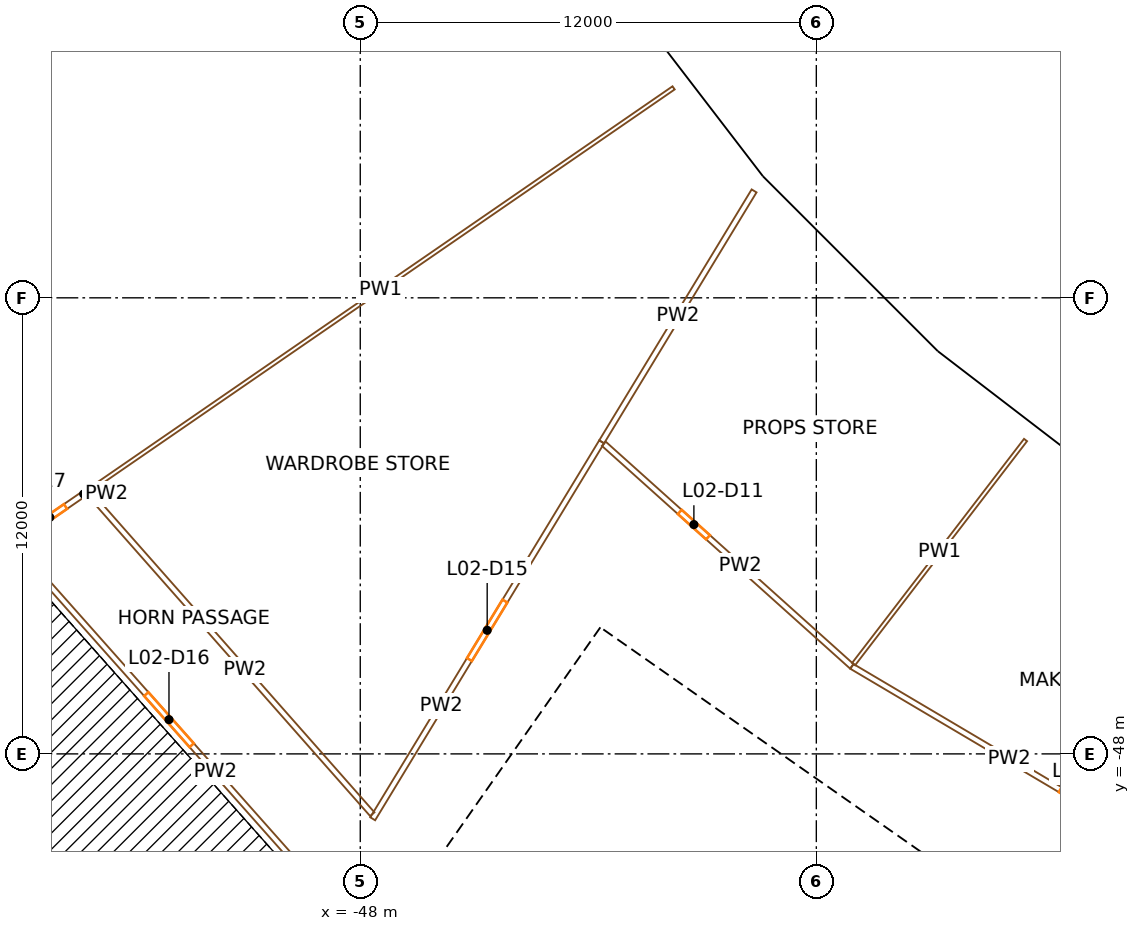
"""IFC4 building model, lengths in metres.
Left out: names, types, materials, properties, quantities, classifications, styles, units other than length and angle.
Written with IfcOpenShell. Run it as: python <this file> out.ifc"""

import sys

from ifc_helpers import new_model, si_unit, direction, frame, frame_2d, origin, origin_2d, place, context, subcontext, project, spatial, rectangle, extrude, element, fill, save


model = new_model("IFC4")
c1 = context("Model", 3, precision=1e-05, world=origin(), true_north=direction((0.0, 1.0)))
c2 = subcontext(c1, "Body", "Model", "MODEL_VIEW")
j1 = project(units=[si_unit("LENGTHUNIT", "METRE"), si_unit("PLANEANGLEUNIT", "RADIAN")], contexts=[c1])
p1 = place(None, origin())
s1 = spatial("IfcSite", under=j1, at=p1, CompositionType="ELEMENT")
p2 = place(p1, origin())
s2 = spatial("IfcBuilding", under=s1, at=p2, CompositionType="ELEMENT")
p3 = place(p2, frame((0.0, 0.0, 18.0)))
s3 = spatial("IfcBuildingStorey", under=s2, at=p3, CompositionType="ELEMENT", Elevation=18.0)
p4 = place(p3, frame((-48.433, -32.362, 0.0), z_axis=(0.0, 0.0, 1.0), x_axis=(0.55557023302, -0.831469612303, 0.0)))
e1 = element("IfcColumn", 1, at=p4, inside=s3, PredefinedType="COLUMN", context=c2, shape_type="SweptSolid", body=[
    extrude(rectangle(XDim=1.4, YDim=1.8, at=origin_2d()), origin(), (0.0, 0.0, 1.0), 9.0),
])
p5 = place(p3, frame((-38.156, -33.462, 0.0), z_axis=(0.0, 0.0, 1.0), x_axis=(0.6593458151, -0.751839807479, 0.0)))
e2 = element("IfcColumn", 2, at=p5, inside=s3, PredefinedType="COLUMN", context=c2, shape_type="SweptSolid", body=[
    extrude(rectangle(XDim=1.1, YDim=1.3, at=origin_2d()), origin(), (0.0, 0.0, 1.0), 9.0),
])
p6 = place(p3, frame((-43.795, -38.407, 0.0), z_axis=(0.0, 0.0, 1.0), x_axis=(0.6593458151, -0.751839807479, 0.0)))
e3 = element("IfcColumn", 3, at=p6, inside=s3, PredefinedType="COLUMN", context=c2, shape_type="SweptSolid", body=[
    extrude(rectangle(XDim=1.4, YDim=1.8, at=origin_2d()), origin(), (0.0, 0.0, 1.0), 9.0),
])
p7 = place(p3, frame((-33.462, -38.156, 0.0), z_axis=(0.0, 0.0, 1.0), x_axis=(0.751839807479, -0.6593458151, 0.0)))
e4 = element("IfcColumn", 4, at=p7, inside=s3, PredefinedType="COLUMN", context=c2, shape_type="SweptSolid", body=[
    extrude(rectangle(XDim=1.1, YDim=1.3, at=origin_2d()), origin(), (0.0, 0.0, 1.0), 9.0),
])
for number, where, z_axis, x_axis in (
    (5, (-38.407, -43.795, 0.0), (0.0, 0.0, 1.0), (0.752, -0.659, 0.0)),
    (6, (-32.362, -48.433, 0.0), (0.0, 0.0, 1.0), (0.831, -0.556, 0.0)),
):
    element("IfcColumn", number, at=place(p3, frame(where, z_axis=z_axis, x_axis=x_axis)), inside=s3, PredefinedType="COLUMN", context=c2, shape_type="SweptSolid", body=[
        extrude(rectangle(XDim=1.4, YDim=1.8, at=origin_2d()), origin(), (0.0, 0.0, 1.0), 9.0),
    ])
p8 = place(p3, frame((-49.779, -57.191, 0.0), z_axis=(0.0, 0.0, 1.0), x_axis=(0.573577477574, 0.819151315216, 0.0)))
e7 = element("IfcWall", 7, at=p8, inside=s3, PredefinedType="SHEAR", context=c2, shape_type="SweptSolid", body=[
    extrude(rectangle(XDim=14.8, YDim=0.9, at=frame_2d((7.4, 0.0))), origin(), (0.0, 0.0, 1.0), 8.6),
])
p9 = place(p8, frame((6.7, 0.0, 0.0)))
e8 = element("IfcOpeningElement", 8, at=p9, cuts=e7, PredefinedType="OPENING", context=c2, shape_type="SweptSolid", body=[
    extrude(rectangle(XDim=1.4, YDim=2.1, at=frame_2d((0.7, 1.05))), frame((0.0, 0.46, 0.0), z_axis=(0.0, -1.0, 0.0), x_axis=(1.0, 0.0, 0.0)), (0.0, 0.0, 1.0), 0.92),
])
p10 = place(p3, frame((-28.854, -54.324, 0.0), z_axis=(0.0, 0.0, 1.0), x_axis=(-0.819145767589, 0.573585400304, 0.0)))
e9 = element("IfcWall", 9, at=p10, inside=s3, PredefinedType="SHEAR", context=c2, shape_type="SweptSolid", body=[
    extrude(rectangle(XDim=15.045, YDim=0.9, at=frame_2d((7.523, 0.0))), origin(), (0.0, 0.0, 1.0), 8.6),
])
p11 = place(p10, frame((0.6, 0.0, 0.0)))
e10 = element("IfcOpeningElement", 10, at=p11, cuts=e9, PredefinedType="OPENING", context=c2, shape_type="SweptSolid", body=[
    extrude(rectangle(XDim=1.0, YDim=2.1, at=frame_2d((0.5, 1.05))), frame((0.0, 0.46, 0.0), z_axis=(0.0, -1.0, 0.0), x_axis=(1.0, 0.0, 0.0)), (0.0, 0.0, 1.0), 0.92),
])
p12 = place(p10, frame((3.275, 0.0, 0.0)))
e11 = element("IfcOpeningElement", 11, at=p12, cuts=e9, PredefinedType="OPENING", context=c2, shape_type="SweptSolid", body=[
    extrude(rectangle(XDim=1.0, YDim=2.1, at=frame_2d((0.5, 1.05))), frame((0.0, 0.46, 0.0), z_axis=(0.0, -1.0, 0.0), x_axis=(1.0, 0.0, 0.0)), (0.0, 0.0, 1.0), 0.92),
])
p13 = place(p10, frame((6.225, 0.0, 0.0)))
e12 = element("IfcOpeningElement", 12, at=p13, cuts=e9, PredefinedType="OPENING", context=c2, shape_type="SweptSolid", body=[
    extrude(rectangle(XDim=0.9, YDim=2.1, at=frame_2d((0.45, 1.05))), frame((0.0, 0.46, 0.0), z_axis=(0.0, -1.0, 0.0), x_axis=(1.0, 0.0, 0.0)), (0.0, 0.0, 1.0), 0.92),
])
p14 = place(p10, frame((13.495, 0.0, 0.0)))
e13 = element("IfcOpeningElement", 13, at=p14, cuts=e9, PredefinedType="OPENING", context=c2, shape_type="SweptSolid", body=[
    extrude(rectangle(XDim=1.1, YDim=2.1, at=frame_2d((0.55, 1.05))), frame((0.0, 0.46, 0.0), z_axis=(0.0, -1.0, 0.0), x_axis=(1.0, 0.0, 0.0)), (0.0, 0.0, 1.0), 0.92),
])
p15 = place(p3, frame((-43.204, -60.696, 0.0), z_axis=(0.0, 0.0, 1.0), x_axis=(0.573571992966, 0.819155155563, 0.0)))
e14 = element("IfcWall", 14, at=p15, inside=s3, PredefinedType="SOLIDWALL", context=c2, shape_type="SweptSolid", body=[
    extrude(rectangle(XDim=13.0, YDim=0.3, at=frame_2d((6.5, 0.0))), origin(), (0.0, 0.0, 1.0), 8.6),
])
p16 = place(p3, frame((-37.936, -52.91, 0.0), z_axis=(0.0, 0.0, 1.0), x_axis=(-0.819147518138, 0.57358290031, 0.0)))
e15 = element("IfcWall", 15, at=p16, inside=s3, PredefinedType="SOLIDWALL", context=c2, shape_type="SweptSolid", body=[
    extrude(rectangle(XDim=6.795, YDim=0.3, at=frame_2d((3.398, 0.0))), origin(), (0.0, 0.0, 1.0), 8.6),
])
p17 = place(p16, frame((5.32, 0.0, 0.0)))
e16 = element("IfcOpeningElement", 16, at=p17, cuts=e15, PredefinedType="OPENING", context=c2, shape_type="SweptSolid", body=[
    extrude(rectangle(XDim=1.1, YDim=2.1, at=frame_2d((0.55, 1.05))), frame((0.0, 0.16, 0.0), z_axis=(0.0, -1.0, 0.0), x_axis=(1.0, 0.0, 0.0)), (0.0, 0.0, 1.0), 0.32),
])
p18 = place(p3, frame((-41.587, -48.369, 0.0), z_axis=(0.0, 0.0, 1.0), x_axis=(0.573495128918, 0.819208970354, 0.0)))
e17 = element("IfcWall", 17, at=p18, inside=s3, PredefinedType="SOLIDWALL", context=c2, shape_type="SweptSolid", body=[
    extrude(rectangle(XDim=0.5, YDim=0.3, at=frame_2d((0.25, 0.0))), origin(), (0.0, 0.0, 1.0), 4.3),
])
p19 = place(p3, frame((-37.555, -32.975, 0.0), z_axis=(0.0, 0.0, 1.0), x_axis=(-0.608780327927, 0.793338838284, 0.0)))
e18 = element("IfcWall", 18, at=p19, inside=s3, PredefinedType="SOLIDWALL", context=c2, shape_type="SweptSolid", body=[
    extrude(rectangle(XDim=6.597, YDim=0.45, at=frame_2d((3.298, 0.0))), origin(), (0.0, 0.0, 1.0), 7.7),
])
p20 = place(p3, frame((-32.993, -37.532, 0.0), z_axis=(0.0, 0.0, 1.0), x_axis=(-0.707106781187, 0.707106781187, 0.0)))
e19 = element("IfcWall", 19, at=p20, inside=s3, PredefinedType="SOLIDWALL", context=c2, shape_type="SweptSolid", body=[
    extrude(rectangle(XDim=6.419, YDim=0.45, at=frame_2d((3.209, 0.0))), origin(), (0.0, 0.0, 1.0), 7.7),
])
p21 = place(p3, frame((-27.741, -41.571, 0.0), z_axis=(0.0, 0.0, 1.0), x_axis=(-0.793338838284, 0.608780327927, 0.0)))
e20 = element("IfcWall", 20, at=p21, inside=s3, PredefinedType="SOLIDWALL", context=c2, shape_type="SweptSolid", body=[
    extrude(rectangle(XDim=6.597, YDim=0.45, at=frame_2d((3.298, 0.0))), origin(), (0.0, 0.0, 1.0), 7.7),
])
p22 = place(p3, frame((-57.157, -42.456, 0.0), z_axis=(0.0, 0.0, 1.0), x_axis=(0.823667994332, 0.567072336755, 0.0)))
e21 = element("IfcWall", 21, at=p22, inside=s3, PredefinedType="PARTITIONING", context=c2, shape_type="SweptSolid", body=[
    extrude(rectangle(XDim=2.401, YDim=0.15, at=frame_2d((1.201, 0.0))), origin(), (0.0, 0.0, 1.0), 7.6),
])
p23 = place(p22, frame((0.701, 0.0, 0.0)))
e22 = element("IfcOpeningElement", 22, at=p23, cuts=e21, PredefinedType="OPENING", context=c2, shape_type="SweptSolid", body=[
    extrude(rectangle(XDim=1.0, YDim=2.1, at=frame_2d((0.5, 1.05))), frame((0.0, 0.085, 0.0), z_axis=(0.0, -1.0, 0.0), x_axis=(1.0, 0.0, 0.0)), (0.0, 0.0, 1.0), 0.17),
])
p24 = place(p3, frame((-55.179, -41.094, 0.0), z_axis=(0.0, 0.0, 1.0), x_axis=(0.823687587854, 0.56704387627, 0.0)))
e23 = element("IfcWall", 23, at=p24, inside=s3, PredefinedType="PARTITIONING", context=c2, shape_type="SweptSolid", body=[
    extrude(rectangle(XDim=18.725, YDim=0.1, at=frame_2d((9.363, 0.0))), origin(), (0.0, 0.0, 1.0), 7.6),
])
p25 = place(p3, frame((-48.959, -51.687, 0.0), z_axis=(0.0, 0.0, 1.0), x_axis=(-0.664036516543, 0.747700143572, 0.0)))
e24 = element("IfcWall", 24, at=p25, inside=s3, PredefinedType="PARTITIONING", context=c2, shape_type="SweptSolid", body=[
    extrude(rectangle(XDim=12.271, YDim=0.15, at=frame_2d((6.135, 0.0))), origin(), (0.0, 0.0, 1.0), 7.6),
])
p26 = place(p25, frame((5.235, 0.0, 0.0)))
e25 = element("IfcOpeningElement", 25, at=p26, cuts=e24, PredefinedType="OPENING", context=c2, shape_type="SweptSolid", body=[
    extrude(rectangle(XDim=1.8, YDim=2.1, at=frame_2d((0.9, 1.05))), frame((0.0, 0.085, 0.0), z_axis=(0.0, -1.0, 0.0), x_axis=(1.0, 0.0, 0.0)), (0.0, 0.0, 1.0), 0.17),
])
p27 = place(p3, frame((-47.683, -49.587, 0.0), z_axis=(0.0, 0.0, 1.0), x_axis=(-0.661713482334, 0.749756805436, 0.0)))
e26 = element("IfcWall", 26, at=p27, inside=s3, PredefinedType="PARTITIONING", context=c2, shape_type="SweptSolid", body=[
    extrude(rectangle(XDim=11.253, YDim=0.15, at=frame_2d((5.626, 0.0))), origin(), (0.0, 0.0, 1.0), 7.6),
])
p28 = place(p3, frame((-47.673, -49.708, 0.0), z_axis=(0.0, 0.0, 1.0), x_axis=(0.519159839294, 0.854677167862, 0.0)))
e27 = element("IfcWall", 27, at=p28, inside=s3, PredefinedType="PARTITIONING", context=c2, shape_type="SweptSolid", body=[
    extrude(rectangle(XDim=11.605, YDim=0.15, at=frame_2d((5.802, 0.0))), origin(), (0.0, 0.0, 1.0), 7.6),
])
p29 = place(p28, frame((4.902, 0.0, 0.0)))
e28 = element("IfcOpeningElement", 28, at=p29, cuts=e27, PredefinedType="OPENING", context=c2, shape_type="SweptSolid", body=[
    extrude(rectangle(XDim=1.8, YDim=2.1, at=frame_2d((0.9, 1.05))), frame((0.0, 0.085, 0.0), z_axis=(0.0, -1.0, 0.0), x_axis=(1.0, 0.0, 0.0)), (0.0, 0.0, 1.0), 0.17),
])
p30 = place(p3, frame((-41.592, -39.839, 0.0), z_axis=(0.0, 0.0, 1.0), x_axis=(0.744252572607, -0.667898276812, 0.0)))
e29 = element("IfcWall", 29, at=p30, inside=s3, PredefinedType="PARTITIONING", context=c2, shape_type="SweptSolid", body=[
    extrude(rectangle(XDim=8.771, YDim=0.15, at=frame_2d((4.385, 0.0))), origin(), (0.0, 0.0, 1.0), 7.6),
])
p31 = place(p30, frame((2.685, 0.0, 0.0)))
e30 = element("IfcOpeningElement", 30, at=p31, cuts=e29, PredefinedType="OPENING", context=c2, shape_type="SweptSolid", body=[
    extrude(rectangle(XDim=1.0, YDim=2.1, at=frame_2d((0.5, 1.05))), frame((0.0, 0.085, 0.0), z_axis=(0.0, -1.0, 0.0), x_axis=(1.0, 0.0, 0.0)), (0.0, 0.0, 1.0), 0.17),
])
p32 = place(p3, frame((-37.638, -33.187, 0.0), z_axis=(0.0, 0.0, 1.0), x_axis=(-0.519163683086, -0.854674833, 0.0)))
e31 = element("IfcWall", 31, at=p32, inside=s3, PredefinedType="PARTITIONING", context=c2, shape_type="SweptSolid", body=[
    extrude(rectangle(XDim=7.725, YDim=0.15, at=frame_2d((3.862, 0.0))), origin(), (0.0, 0.0, 1.0), 7.6),
])
p33 = place(p3, frame((-35.065, -45.697, 0.0), z_axis=(0.0, 0.0, 1.0), x_axis=(0.860638818745, -0.509215891022, 0.0)))
e32 = element("IfcWall", 32, at=p33, inside=s3, PredefinedType="PARTITIONING", context=c2, shape_type="SweptSolid", body=[
    extrude(rectangle(XDim=13.741, YDim=0.15, at=frame_2d((6.871, 0.0))), origin(), (0.0, 0.0, 1.0), 7.6),
])
p34 = place(p33, frame((6.37, 0.0, 0.0)))
e33 = element("IfcOpeningElement", 33, at=p34, cuts=e32, PredefinedType="OPENING", context=c2, shape_type="SweptSolid", body=[
    extrude(rectangle(XDim=1.0, YDim=2.1, at=frame_2d((0.5, 1.05))), frame((0.0, 0.085, 0.0), z_axis=(0.0, -1.0, 0.0), x_axis=(1.0, 0.0, 0.0)), (0.0, 0.0, 1.0), 0.17),
])
p35 = place(p3, frame((-30.495, -39.742, 0.0), z_axis=(0.0, 0.0, 1.0), x_axis=(-0.60877839598, -0.793340320788, 0.0)))
e34 = element("IfcWall", 34, at=p35, inside=s3, PredefinedType="PARTITIONING", context=c2, shape_type="SweptSolid", body=[
    extrude(rectangle(XDim=7.432, YDim=0.1, at=frame_2d((3.716, 0.0))), origin(), (0.0, 0.0, 1.0), 7.6),
])
p36 = place(p13, origin())
e35 = element("IfcDoor", 35, at=p36, inside=s3, OperationType="SINGLE_SWING_RIGHT", PredefinedType="DOOR", context=c2, shape_type="SweptSolid", body=[
    extrude(rectangle(XDim=0.9, YDim=2.1, at=frame_2d((0.45, 1.05))), frame((0.0, 0.025, 0.0), z_axis=(0.0, -1.0, 0.0), x_axis=(1.0, 0.0, 0.0)), (0.0, 0.0, 1.0), 0.05),
])
fill(e12, e35)
p37 = place(p9, origin())
e36 = element("IfcDoor", 36, at=p37, inside=s3, OperationType="DOUBLE_DOOR_SINGLE_SWING", PredefinedType="DOOR", context=c2, shape_type="SweptSolid", body=[
    extrude(rectangle(XDim=1.4, YDim=2.1, at=frame_2d((0.7, 1.05))), frame((0.0, 0.025, 0.0), z_axis=(0.0, -1.0, 0.0), x_axis=(1.0, 0.0, 0.0)), (0.0, 0.0, 1.0), 0.05),
])
fill(e8, e36)
p38 = place(p14, origin())
e37 = element("IfcDoor", 37, at=p38, inside=s3, OperationType="SINGLE_SWING_RIGHT", PredefinedType="DOOR", context=c2, shape_type="SweptSolid", body=[
    extrude(rectangle(XDim=1.1, YDim=2.1, at=frame_2d((0.55, 1.05))), frame((0.0, 0.025, 0.0), z_axis=(0.0, -1.0, 0.0), x_axis=(1.0, 0.0, 0.0)), (0.0, 0.0, 1.0), 0.05),
])
fill(e13, e37)
p39 = place(p17, origin())
e38 = element("IfcDoor", 38, at=p39, inside=s3, OperationType="SINGLE_SWING_RIGHT", PredefinedType="DOOR", context=c2, shape_type="SweptSolid", body=[
    extrude(rectangle(XDim=1.1, YDim=2.1, at=frame_2d((0.55, 1.05))), frame((0.0, 0.025, 0.0), z_axis=(0.0, -1.0, 0.0), x_axis=(1.0, 0.0, 0.0)), (0.0, 0.0, 1.0), 0.05),
])
fill(e16, e38)
p40 = place(p31, origin())
e39 = element("IfcDoor", 39, at=p40, inside=s3, OperationType="SINGLE_SWING_LEFT", PredefinedType="DOOR", context=c2, shape_type="SweptSolid", body=[
    extrude(rectangle(XDim=1.0, YDim=2.1, at=frame_2d((0.5, 1.05))), frame((0.0, 0.025, 0.0), z_axis=(0.0, -1.0, 0.0), x_axis=(1.0, 0.0, 0.0)), (0.0, 0.0, 1.0), 0.05),
])
fill(e30, e39)
p41 = place(p34, origin())
e40 = element("IfcDoor", 40, at=p41, inside=s3, OperationType="SINGLE_SWING_RIGHT", PredefinedType="DOOR", context=c2, shape_type="SweptSolid", body=[
    extrude(rectangle(XDim=1.0, YDim=2.1, at=frame_2d((0.5, 1.05))), frame((0.0, 0.025, 0.0), z_axis=(0.0, -1.0, 0.0), x_axis=(1.0, 0.0, 0.0)), (0.0, 0.0, 1.0), 0.05),
])
fill(e33, e40)
p42 = place(p29, origin())
e41 = element("IfcDoor", 41, at=p42, inside=s3, OperationType="DOUBLE_DOOR_SINGLE_SWING", PredefinedType="DOOR", context=c2, shape_type="SweptSolid", body=[
    extrude(rectangle(XDim=1.8, YDim=2.1, at=frame_2d((0.9, 1.05))), frame((0.0, 0.025, 0.0), z_axis=(0.0, -1.0, 0.0), x_axis=(1.0, 0.0, 0.0)), (0.0, 0.0, 1.0), 0.05),
])
fill(e28, e41)
p43 = place(p26, origin())
e42 = element("IfcDoor", 42, at=p43, inside=s3, OperationType="DOUBLE_DOOR_SINGLE_SWING", PredefinedType="DOOR", context=c2, shape_type="SweptSolid", body=[
    extrude(rectangle(XDim=1.8, YDim=2.1, at=frame_2d((0.9, 1.05))), frame((0.0, 0.025, 0.0), z_axis=(0.0, -1.0, 0.0), x_axis=(1.0, 0.0, 0.0)), (0.0, 0.0, 1.0), 0.05),
])
fill(e25, e42)
p44 = place(p23, origin())
e43 = element("IfcDoor", 43, at=p44, inside=s3, OperationType="SINGLE_SWING_RIGHT", PredefinedType="DOOR", context=c2, shape_type="SweptSolid", body=[
    extrude(rectangle(XDim=1.0, YDim=2.1, at=frame_2d((0.5, 1.05))), frame((0.0, 0.025, 0.0), z_axis=(0.0, -1.0, 0.0), x_axis=(1.0, 0.0, 0.0)), (0.0, 0.0, 1.0), 0.05),
])
fill(e22, e43)
save(model, sys.argv[1])
